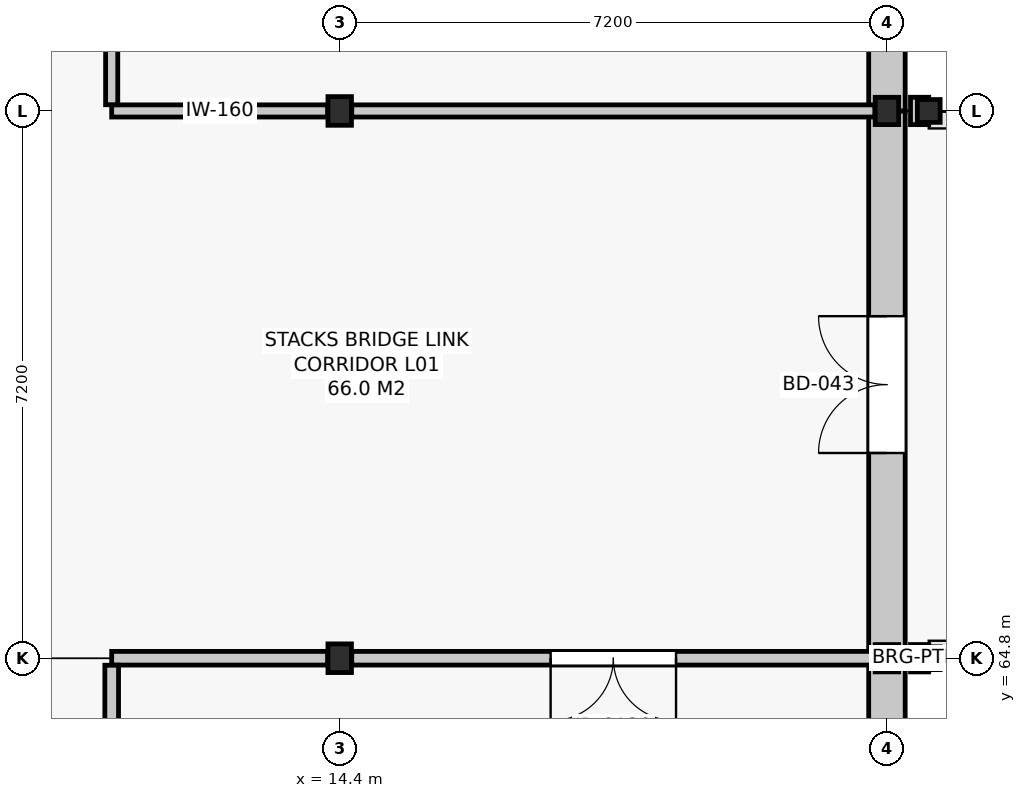
"""IFC4 building model, lengths in metres.
Left out: names, types, materials, properties, quantities, classifications, styles, units other than length and angle.
Written with IfcOpenShell. Run it as: python <this file> out.ifc"""

import sys

from ifc_helpers import new_model, si_unit, direction, frame, frame_2d, origin, origin_2d, place, context, subcontext, project, spatial, rectangle, i_section, extrude, element, fill, save


model = new_model("IFC4")
c1 = context("Model", 3, precision=1e-05, world=origin(), true_north=direction((0.0, 1.0)))
c2 = subcontext(c1, "Body", "Model", "MODEL_VIEW")
j1 = project(units=[si_unit("LENGTHUNIT", "METRE"), si_unit("PLANEANGLEUNIT", "RADIAN")], contexts=[c1])
p1 = place(None, origin())
s1 = spatial("IfcSite", under=j1, at=p1, CompositionType="ELEMENT")
p2 = place(p1, origin())
s2 = spatial("IfcBuilding", under=s1, at=p2, CompositionType="ELEMENT")
p3 = place(p2, frame((0.0, 0.0, 5.4)))
s3 = spatial("IfcBuildingStorey", under=s2, at=p3, CompositionType="ELEMENT", Elevation=5.4)
for number, where, z_axis, x_axis in (
    (1, (14.4, 64.8, 0.0), (0.0, 0.0, 1.0), (1.0, 0.0, 0.0)),
    (2, (14.4, 72.0, 0.0), (0.0, 0.0, 1.0), (1.0, 0.0, 0.0)),
):
    element("IfcColumn", number, at=place(p3, frame(where, z_axis=z_axis, x_axis=x_axis)), inside=s3, PredefinedType="COLUMN", context=c2, shape_type="SweptSolid", body=[
        extrude(i_section(OverallWidth=0.309, OverallDepth=0.377, WebThickness=0.021, FlangeThickness=0.036, FilletRadius=0.027, at=origin_2d()), origin(), (0.0, 0.0, 1.0), 4.8),
    ])
for number, where, z_axis, x_axis in (
    (3, (21.6, 64.8, 0.0), (0.0, 0.0, 1.0), (1.0, 0.0, 0.0)),
    (4, (21.6, 72.0, 0.0), (0.0, 0.0, 1.0), (1.0, 0.0, 0.0)),
):
    element("IfcColumn", number, at=place(p3, frame(where, z_axis=z_axis, x_axis=x_axis)), inside=s3, PredefinedType="COLUMN", context=c2, shape_type="SweptSolid", body=[
        extrude(i_section(OverallWidth=0.309, OverallDepth=0.359, WebThickness=0.021, FlangeThickness=0.035, FilletRadius=0.027, at=origin_2d()), origin(), (0.0, 0.0, 1.0), 4.8),
    ])
for number, where, z_axis, x_axis in (
    (5, (22.15, 64.8, 0.0), (0.0, 0.0, 1.0), (1.0, 0.0, 0.0)),
    (6, (22.15, 72.0, 0.0), (0.0, 0.0, 1.0), (1.0, 0.0, 0.0)),
):
    element("IfcColumn", number, at=place(p3, frame(where, z_axis=z_axis, x_axis=x_axis)), inside=s3, PredefinedType="COLUMN", context=c2, shape_type="SweptSolid", body=[
        extrude(i_section(OverallWidth=0.3, OverallDepth=0.3, WebThickness=0.011, FlangeThickness=0.019, FilletRadius=0.027, at=origin_2d()), origin(), (0.0, 0.0, 1.0), 4.8),
    ])
p4 = place(p3, frame((21.6, 57.6, 0.0), z_axis=(0.0, 0.0, 1.0), x_axis=(0.0, 1.0, 0.0)))
e7 = element("IfcWall", 7, at=p4, inside=s3, PredefinedType="SOLIDWALL", context=c2, shape_type="SweptSolid", body=[
    extrude(rectangle(XDim=7.2, YDim=0.48, at=frame_2d((3.6, 0.0))), origin(), (0.0, 0.0, 1.0), 3.78),
])
p5 = place(p4, frame((3.0, 0.0, 0.95)))
e8 = element("IfcOpeningElement", 8, at=p5, cuts=e7, PredefinedType="OPENING", context=c2, shape_type="SweptSolid", body=[
    extrude(rectangle(XDim=1.2, YDim=2.15, at=frame_2d((0.6, 1.075))), frame((0.0, 0.252, 0.0), z_axis=(0.0, -1.0, 0.0), x_axis=(1.0, 0.0, 0.0)), (0.0, 0.0, 1.0), 0.504),
])
p6 = place(p3, frame((21.6, 64.8, 0.0), z_axis=(0.0, 0.0, 1.0), x_axis=(0.0, 1.0, 0.0)))
e9 = element("IfcWall", 9, at=p6, inside=s3, PredefinedType="SOLIDWALL", context=c2, shape_type="SweptSolid", body=[
    extrude(rectangle(XDim=7.2, YDim=0.48, at=frame_2d((3.6, 0.0))), origin(), (0.0, 0.0, 1.0), 3.78),
])
p7 = place(p6, frame((2.7, 0.0, 0.0)))
e10 = element("IfcOpeningElement", 10, at=p7, cuts=e9, PredefinedType="OPENING", context=c2, shape_type="SweptSolid", body=[
    extrude(rectangle(XDim=1.8, YDim=2.3, at=frame_2d((0.9, 1.15))), frame((0.0, 0.252, 0.0), z_axis=(0.0, -1.0, 0.0), x_axis=(1.0, 0.0, 0.0)), (0.0, 0.0, 1.0), 0.504),
])
p8 = place(p3, frame((21.6, 72.0, 0.0), z_axis=(0.0, 0.0, 1.0), x_axis=(0.0, 1.0, 0.0)))
e11 = element("IfcWall", 11, at=p8, inside=s3, PredefinedType="SOLIDWALL", context=c2, shape_type="SweptSolid", body=[
    extrude(rectangle(XDim=7.2, YDim=0.48, at=frame_2d((3.6, 0.0))), origin(), (0.0, 0.0, 1.0), 3.78),
])
p9 = place(p8, frame((3.0, 0.0, 0.95)))
e12 = element("IfcOpeningElement", 12, at=p9, cuts=e11, PredefinedType="OPENING", context=c2, shape_type="SweptSolid", body=[
    extrude(rectangle(XDim=1.2, YDim=2.15, at=frame_2d((0.6, 1.075))), frame((0.0, 0.252, 0.0), z_axis=(0.0, -1.0, 0.0), x_axis=(1.0, 0.0, 0.0)), (0.0, 0.0, 1.0), 0.504),
])
p10 = place(p3, frame((11.4, 72.0, 0.0), z_axis=(0.0, 0.0, 1.0), x_axis=(1.0, 0.0, 0.0)))
e13 = element("IfcWall", 13, at=p10, inside=s3, PredefinedType="PARTITIONING", context=c2, shape_type="SweptSolid", body=[
    extrude(rectangle(XDim=2.842, YDim=0.16, at=frame_2d((1.421, 0.0))), origin(), (0.0, 0.0, 1.0), 3.885),
])
p11 = place(p3, frame((14.559, 72.0, 0.0), z_axis=(0.0, 0.0, 1.0), x_axis=(1.0, 0.0, 0.0)))
e14 = element("IfcWall", 14, at=p11, inside=s3, PredefinedType="PARTITIONING", context=c2, shape_type="SweptSolid", body=[
    extrude(rectangle(XDim=6.883, YDim=0.16, at=frame_2d((3.441, 0.0))), origin(), (0.0, 0.0, 1.0), 3.885),
])
p12 = place(p3, frame((11.4, 64.8, 0.0), z_axis=(0.0, 0.0, 1.0), x_axis=(1.0, 0.0, 0.0)))
e15 = element("IfcWall", 15, at=p12, inside=s3, PredefinedType="PARTITIONING", context=c2, shape_type="SweptSolid", body=[
    extrude(rectangle(XDim=2.842, YDim=0.18, at=frame_2d((1.421, 0.0))), origin(), (0.0, 0.0, 1.0), 3.885),
])
p13 = place(p3, frame((14.559, 64.8, 0.0), z_axis=(0.0, 0.0, 1.0), x_axis=(1.0, 0.0, 0.0)))
e16 = element("IfcWall", 16, at=p13, inside=s3, PredefinedType="PARTITIONING", context=c2, shape_type="SweptSolid", body=[
    extrude(rectangle(XDim=6.883, YDim=0.18, at=frame_2d((3.441, 0.0))), origin(), (0.0, 0.0, 1.0), 3.885),
])
p14 = place(p13, frame((2.616, 0.0, 0.0)))
e17 = element("IfcOpeningElement", 17, at=p14, cuts=e16, PredefinedType="OPENING", context=c2, shape_type="SweptSolid", body=[
    extrude(rectangle(XDim=1.65, YDim=2.25, at=frame_2d((0.825, 1.125))), frame((0.0, 0.102, 0.0), z_axis=(0.0, -1.0, 0.0), x_axis=(1.0, 0.0, 0.0)), (0.0, 0.0, 1.0), 0.204),
])
p15 = place(p3, frame((11.4, 72.082, 0.0), z_axis=(0.0, 0.0, 1.0), x_axis=(0.0, 1.0, 0.0)))
e18 = element("IfcWall", 18, at=p15, inside=s3, PredefinedType="PARTITIONING", context=c2, shape_type="SweptSolid", body=[
    extrude(rectangle(XDim=24.236, YDim=0.16, at=frame_2d((12.118, 0.0))), origin(), (0.0, 0.0, 1.0), 3.885),
])
p16 = place(p15, frame((11.618, 0.0, 0.0)))
e19 = element("IfcOpeningElement", 19, at=p16, cuts=e18, PredefinedType="OPENING", context=c2, shape_type="SweptSolid", body=[
    extrude(rectangle(XDim=1.0, YDim=2.15, at=frame_2d((0.5, 1.075))), frame((0.0, 0.092, 0.0), z_axis=(0.0, -1.0, 0.0), x_axis=(1.0, 0.0, 0.0)), (0.0, 0.0, 1.0), 0.184),
])
p17 = place(p3, frame((11.4, 28.855, 0.0), z_axis=(0.0, 0.0, 1.0), x_axis=(0.0, 1.0, 0.0)))
e20 = element("IfcWall", 20, at=p17, inside=s3, PredefinedType="PARTITIONING", context=c2, shape_type="SweptSolid", body=[
    extrude(rectangle(XDim=35.853, YDim=0.18, at=frame_2d((17.927, 0.0))), origin(), (0.0, 0.0, 1.0), 3.885),
])
p18 = place(p17, frame((17.102, 0.0, 0.0)))
e21 = element("IfcOpeningElement", 21, at=p18, cuts=e20, PredefinedType="OPENING", context=c2, shape_type="SweptSolid", body=[
    extrude(rectangle(XDim=1.65, YDim=2.25, at=frame_2d((0.825, 1.125))), frame((0.0, 0.102, 0.0), z_axis=(0.0, -1.0, 0.0), x_axis=(1.0, 0.0, 0.0)), (0.0, 0.0, 1.0), 0.204),
])
p19 = place(p7, origin())
e22 = element("IfcDoor", 22, at=p19, inside=s3, OperationType="DOUBLE_DOOR_SINGLE_SWING", PredefinedType="DOOR", context=c2, shape_type="SweptSolid", body=[
    extrude(rectangle(XDim=1.8, YDim=2.3, at=frame_2d((0.9, 1.15))), frame((0.0, 0.025, 0.0), z_axis=(0.0, -1.0, 0.0), x_axis=(1.0, 0.0, 0.0)), (0.0, 0.0, 1.0), 0.05),
])
fill(e10, e22)
p20 = place(p14, frame((1.65, 0.0, 0.0), z_axis=(0.0, 0.0, 1.0), x_axis=(-1.0, 0.0, 0.0)))
e23 = element("IfcDoor", 23, at=p20, inside=s3, OperationType="DOUBLE_DOOR_SINGLE_SWING", PredefinedType="DOOR", context=c2, shape_type="SweptSolid", body=[
    extrude(rectangle(XDim=1.65, YDim=2.25, at=frame_2d((0.825, 1.125))), frame((0.0, 0.025, 0.0), z_axis=(0.0, -1.0, 0.0), x_axis=(1.0, 0.0, 0.0)), (0.0, 0.0, 1.0), 0.05),
])
fill(e17, e23)
save(model, sys.argv[1])
